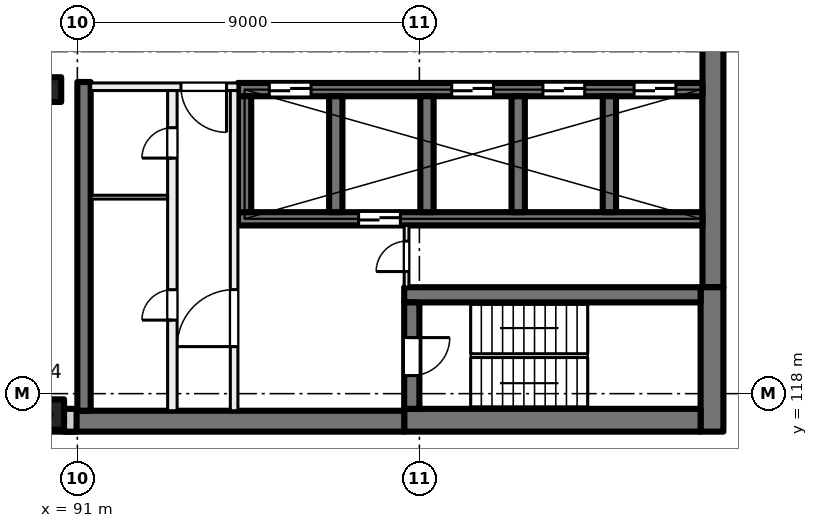
"""IFC4 building model, lengths in metres.
Left out: names, types, materials, properties, quantities, classifications, styles, units other than length and angle.
Written with IfcOpenShell. Run it as: python <this file> out.ifc"""

import sys

from ifc_helpers import new_model, si_unit, direction, frame, frame_2d, origin, origin_2d, place, context, subcontext, project, spatial, rectangle, extrude, element, fill, save


model = new_model("IFC4")
c1 = context("Model", 3, precision=1e-05, world=origin(), true_north=direction((0.0, 1.0)))
c2 = subcontext(c1, "Body", "Model", "MODEL_VIEW")
j1 = project(units=[si_unit("LENGTHUNIT", "METRE"), si_unit("PLANEANGLEUNIT", "RADIAN")], contexts=[c1])
p1 = place(None, origin())
s1 = spatial("IfcSite", under=j1, at=p1, CompositionType="ELEMENT")
p2 = place(p1, origin())
s2 = spatial("IfcBuilding", under=s1, at=p2, CompositionType="ELEMENT")
p3 = place(p2, frame((0.0, 0.0, 178.5)))
s3 = spatial("IfcBuildingStorey", under=s2, at=p3, CompositionType="ELEMENT", Elevation=178.5)
p4 = place(p3, frame((90.25, 126.0, 0.0), z_axis=(0.0, 0.0, 1.0), x_axis=(1.0, 0.0, 0.0)))
e1 = element("IfcColumn", 1, at=p4, inside=s3, PredefinedType="COLUMN", context=c2, shape_type="SweptSolid", body=[
    extrude(rectangle(XDim=0.65, YDim=0.65, at=origin_2d()), origin(), (0.0, 0.0, 1.0), 4.0),
])
p5 = place(p3, frame((90.25, 117.45, 0.0), z_axis=(0.0, 0.0, 1.0), x_axis=(1.0, 0.0, 0.0)))
e2 = element("IfcColumn", 2, at=p5, inside=s3, PredefinedType="COLUMN", context=c2, shape_type="SweptSolid", body=[
    extrude(rectangle(XDim=0.8, YDim=0.8, at=origin_2d()), origin(), (0.0, 0.0, 1.0), 4.0),
])
p6 = place(p3, frame((107.725, 135.2, 0.0), z_axis=(0.0, 0.0, 1.0), x_axis=(0.0, -1.0, 0.0)))
e3 = element("IfcWall", 3, at=p6, inside=s3, PredefinedType="SHEAR", context=c2, shape_type="SweptSolid", body=[
    extrude(rectangle(XDim=14.4, YDim=0.55, at=frame_2d((7.2, 0.0))), origin(), (0.0, 0.0, 1.0), 4.0),
])
p7 = place(p3, frame((107.7, 120.8, 0.0), z_axis=(0.0, 0.0, 1.0), x_axis=(0.0, -1.0, 0.0)))
e4 = element("IfcWall", 4, at=p7, inside=s3, PredefinedType="SHEAR", context=c2, shape_type="SweptSolid", body=[
    extrude(rectangle(XDim=3.8, YDim=0.6, at=frame_2d((1.9, 0.0))), origin(), (0.0, 0.0, 1.0), 4.0),
])
p8 = place(p3, frame((107.4, 117.3, 0.0), z_axis=(0.0, 0.0, 1.0), x_axis=(-1.0, 0.0, 0.0)))
e5 = element("IfcWall", 5, at=p8, inside=s3, PredefinedType="SHEAR", context=c2, shape_type="SweptSolid", body=[
    extrude(rectangle(XDim=7.8, YDim=0.6, at=frame_2d((3.9, 0.0))), origin(), (0.0, 0.0, 1.0), 4.0),
])
p9 = place(p3, frame((99.6, 117.275, 0.0), z_axis=(0.0, 0.0, 1.0), x_axis=(-1.0, 0.0, 0.0)))
e6 = element("IfcWall", 6, at=p9, inside=s3, PredefinedType="SHEAR", context=c2, shape_type="SweptSolid", body=[
    extrude(rectangle(XDim=8.95, YDim=0.55, at=frame_2d((4.475, 0.0))), origin(), (0.0, 0.0, 1.0), 4.0),
])
p10 = place(p3, frame((107.4, 120.6, 0.0), z_axis=(0.0, 0.0, 1.0), x_axis=(-1.0, 0.0, 0.0)))
e7 = element("IfcWall", 7, at=p10, inside=s3, PredefinedType="SHEAR", context=c2, shape_type="SweptSolid", body=[
    extrude(rectangle(XDim=7.8, YDim=0.4, at=frame_2d((3.9, 0.0))), origin(), (0.0, 0.0, 1.0), 4.0),
])
p11 = place(p3, frame((99.8, 120.4, 0.0), z_axis=(0.0, 0.0, 1.0), x_axis=(0.0, -1.0, 0.0)))
e8 = element("IfcWall", 8, at=p11, inside=s3, PredefinedType="SHEAR", context=c2, shape_type="SweptSolid", body=[
    extrude(rectangle(XDim=2.8, YDim=0.4, at=frame_2d((1.4, 0.0))), origin(), (0.0, 0.0, 1.0), 4.0),
])
p12 = place(p11, frame((0.925, 0.0, 0.0)))
e9 = element("IfcOpeningElement", 9, at=p12, cuts=e8, PredefinedType="OPENING", context=c2, shape_type="SweptSolid", body=[
    extrude(rectangle(XDim=1.0, YDim=2.1, at=frame_2d((0.5, 1.05))), frame((0.0, 0.21, 0.0), z_axis=(0.0, -1.0, 0.0), x_axis=(1.0, 0.0, 0.0)), (0.0, 0.0, 1.0), 0.42),
])
p13 = place(p3, frame((107.45, 126.0, 0.0), z_axis=(0.0, 0.0, 1.0), x_axis=(-1.0, 0.0, 0.0)))
e10 = element("IfcWall", 10, at=p13, inside=s3, PredefinedType="SHEAR", context=c2, shape_type="SweptSolid", body=[
    extrude(rectangle(XDim=12.225, YDim=0.35, at=frame_2d((6.112, 0.0))), origin(), (0.0, 0.0, 1.0), 4.0),
])
p14 = place(p13, frame((0.7, 0.0, 0.0)))
e11 = element("IfcOpeningElement", 11, at=p14, cuts=e10, PredefinedType="OPENING", context=c2, shape_type="SweptSolid", body=[
    extrude(rectangle(XDim=1.1, YDim=2.1, at=frame_2d((0.55, 1.05))), frame((0.0, 0.185, 0.0), z_axis=(0.0, -1.0, 0.0), x_axis=(1.0, 0.0, 0.0)), (0.0, 0.0, 1.0), 0.37),
])
p15 = place(p13, frame((3.1, 0.0, 0.0)))
e12 = element("IfcOpeningElement", 12, at=p15, cuts=e10, PredefinedType="OPENING", context=c2, shape_type="SweptSolid", body=[
    extrude(rectangle(XDim=1.1, YDim=2.1, at=frame_2d((0.55, 1.05))), frame((0.0, 0.185, 0.0), z_axis=(0.0, -1.0, 0.0), x_axis=(1.0, 0.0, 0.0)), (0.0, 0.0, 1.0), 0.37),
])
p16 = place(p13, frame((5.5, 0.0, 0.0)))
e13 = element("IfcOpeningElement", 13, at=p16, cuts=e10, PredefinedType="OPENING", context=c2, shape_type="SweptSolid", body=[
    extrude(rectangle(XDim=1.1, YDim=2.1, at=frame_2d((0.55, 1.05))), frame((0.0, 0.185, 0.0), z_axis=(0.0, -1.0, 0.0), x_axis=(1.0, 0.0, 0.0)), (0.0, 0.0, 1.0), 0.37),
])
p17 = place(p13, frame((10.3, 0.0, 0.0)))
e14 = element("IfcOpeningElement", 14, at=p17, cuts=e10, PredefinedType="OPENING", context=c2, shape_type="SweptSolid", body=[
    extrude(rectangle(XDim=1.1, YDim=2.1, at=frame_2d((0.55, 1.05))), frame((0.0, 0.185, 0.0), z_axis=(0.0, -1.0, 0.0), x_axis=(1.0, 0.0, 0.0)), (0.0, 0.0, 1.0), 0.37),
])
p18 = place(p3, frame((107.45, 122.6, 0.0), z_axis=(0.0, 0.0, 1.0), x_axis=(-1.0, 0.0, 0.0)))
e15 = element("IfcWall", 15, at=p18, inside=s3, PredefinedType="SHEAR", context=c2, shape_type="SweptSolid", body=[
    extrude(rectangle(XDim=12.225, YDim=0.35, at=frame_2d((6.112, 0.0))), origin(), (0.0, 0.0, 1.0), 4.0),
])
p19 = place(p18, frame((7.95, 0.0, 0.0)))
e16 = element("IfcOpeningElement", 16, at=p19, cuts=e15, PredefinedType="OPENING", context=c2, shape_type="SweptSolid", body=[
    extrude(rectangle(XDim=1.1, YDim=2.1, at=frame_2d((0.55, 1.05))), frame((0.0, 0.185, 0.0), z_axis=(0.0, -1.0, 0.0), x_axis=(1.0, 0.0, 0.0)), (0.0, 0.0, 1.0), 0.37),
])
for number, where, z_axis, x_axis in (
    (17, (105.0, 125.825, 0.0), (0.0, 0.0, 1.0), (0.0, -1.0, 0.0)),
    (18, (102.6, 125.825, 0.0), (0.0, 0.0, 1.0), (0.0, -1.0, 0.0)),
    (19, (100.2, 125.825, 0.0), (0.0, 0.0, 1.0), (0.0, -1.0, 0.0)),
    (20, (97.8, 125.825, 0.0), (0.0, 0.0, 1.0), (0.0, -1.0, 0.0)),
    (21, (95.4, 125.825, 0.0), (0.0, 0.0, 1.0), (0.0, -1.0, 0.0)),
):
    element("IfcWall", number, at=place(p3, frame(where, z_axis=z_axis, x_axis=x_axis)), inside=s3, PredefinedType="SHEAR", context=c2, shape_type="SweptSolid", body=[
        extrude(rectangle(XDim=3.05, YDim=0.35, at=frame_2d((1.525, 0.0))), origin(), (0.0, 0.0, 1.0), 4.0),
    ])
p20 = place(p3, frame((91.175, 126.2, 0.0), z_axis=(0.0, 0.0, 1.0), x_axis=(0.0, -1.0, 0.0)))
e22 = element("IfcWall", 22, at=p20, inside=s3, PredefinedType="SHEAR", context=c2, shape_type="SweptSolid", body=[
    extrude(rectangle(XDim=8.65, YDim=0.35, at=frame_2d((4.325, 0.0))), origin(), (0.0, 0.0, 1.0), 4.0),
])
p21 = place(p3, frame((90.98, 117.3, 0.0), z_axis=(0.0, 0.0, 1.0), x_axis=(-1.0, 0.0, 0.0)))
e23 = element("IfcWall", 23, at=p21, inside=s3, PredefinedType="SOLIDWALL", context=c2, shape_type="SweptSolid", body=[
    extrude(rectangle(XDim=33.745, YDim=0.6, at=frame_2d((16.873, 0.0))), origin(), (0.0, 0.0, 1.0), 3.625),
])
p22 = place(p21, frame((1.48, 0.0, 0.9)))
e24 = element("IfcOpeningElement", 24, at=p22, cuts=e23, PredefinedType="OPENING", context=c2, shape_type="SweptSolid", body=[
    extrude(rectangle(XDim=3.0, YDim=2.4, at=frame_2d((1.5, 1.2))), frame((0.0, 0.31, 0.0), z_axis=(0.0, -1.0, 0.0), x_axis=(1.0, 0.0, 0.0)), (0.0, 0.0, 1.0), 0.62),
])
p23 = place(p21, frame((5.98, 0.0, 0.9)))
e25 = element("IfcOpeningElement", 25, at=p23, cuts=e23, PredefinedType="OPENING", context=c2, shape_type="SweptSolid", body=[
    extrude(rectangle(XDim=3.0, YDim=2.4, at=frame_2d((1.5, 1.2))), frame((0.0, 0.31, 0.0), z_axis=(0.0, -1.0, 0.0), x_axis=(1.0, 0.0, 0.0)), (0.0, 0.0, 1.0), 0.62),
])
p24 = place(p21, frame((10.48, 0.0, 0.9)))
e26 = element("IfcOpeningElement", 26, at=p24, cuts=e23, PredefinedType="OPENING", context=c2, shape_type="SweptSolid", body=[
    extrude(rectangle(XDim=3.0, YDim=2.4, at=frame_2d((1.5, 1.2))), frame((0.0, 0.31, 0.0), z_axis=(0.0, -1.0, 0.0), x_axis=(1.0, 0.0, 0.0)), (0.0, 0.0, 1.0), 0.62),
])
p25 = place(p21, frame((14.98, 0.0, 0.9)))
e27 = element("IfcOpeningElement", 27, at=p25, cuts=e23, PredefinedType="OPENING", context=c2, shape_type="SweptSolid", body=[
    extrude(rectangle(XDim=3.0, YDim=2.4, at=frame_2d((1.5, 1.2))), frame((0.0, 0.31, 0.0), z_axis=(0.0, -1.0, 0.0), x_axis=(1.0, 0.0, 0.0)), (0.0, 0.0, 1.0), 0.62),
])
p26 = place(p21, frame((19.48, 0.0, 0.9)))
e28 = element("IfcOpeningElement", 28, at=p26, cuts=e23, PredefinedType="OPENING", context=c2, shape_type="SweptSolid", body=[
    extrude(rectangle(XDim=3.0, YDim=2.4, at=frame_2d((1.5, 1.2))), frame((0.0, 0.31, 0.0), z_axis=(0.0, -1.0, 0.0), x_axis=(1.0, 0.0, 0.0)), (0.0, 0.0, 1.0), 0.62),
])
p27 = place(p21, frame((23.98, 0.0, 0.9)))
e29 = element("IfcOpeningElement", 29, at=p27, cuts=e23, PredefinedType="OPENING", context=c2, shape_type="SweptSolid", body=[
    extrude(rectangle(XDim=3.0, YDim=2.4, at=frame_2d((1.5, 1.2))), frame((0.0, 0.31, 0.0), z_axis=(0.0, -1.0, 0.0), x_axis=(1.0, 0.0, 0.0)), (0.0, 0.0, 1.0), 0.62),
])
p28 = place(p21, frame((29.08, 0.0, 0.0)))
e30 = element("IfcOpeningElement", 30, at=p28, cuts=e23, PredefinedType="OPENING", context=c2, shape_type="SweptSolid", body=[
    extrude(rectangle(XDim=1.8, YDim=2.4, at=frame_2d((0.9, 1.2))), frame((0.0, 0.31, 0.0), z_axis=(0.0, -1.0, 0.0), x_axis=(1.0, 0.0, 0.0)), (0.0, 0.0, 1.0), 0.62),
])
p29 = place(p3, frame((95.225, 126.075, 0.0), z_axis=(0.0, 0.0, 1.0), x_axis=(-1.0, 0.0, 0.0)))
e31 = element("IfcWall", 31, at=p29, inside=s3, PredefinedType="PARTITIONING", context=c2, shape_type="SweptSolid", body=[
    extrude(rectangle(XDim=3.875, YDim=0.2, at=frame_2d((1.938, 0.0))), origin(), (0.0, 0.0, 1.0), 3.625),
])
p30 = place(p29, frame((0.3, 0.0, 0.0)))
e32 = element("IfcOpeningElement", 32, at=p30, cuts=e31, PredefinedType="OPENING", context=c2, shape_type="SweptSolid", body=[
    extrude(rectangle(XDim=1.2, YDim=2.1, at=frame_2d((0.6, 1.05))), frame((0.0, 0.11, 0.0), z_axis=(0.0, -1.0, 0.0), x_axis=(1.0, 0.0, 0.0)), (0.0, 0.0, 1.0), 0.22),
])
p31 = place(p3, frame((95.125, 117.55, 0.0), z_axis=(0.0, 0.0, 1.0), x_axis=(0.0, 1.0, 0.0)))
e33 = element("IfcWall", 33, at=p31, inside=s3, PredefinedType="PARTITIONING", context=c2, shape_type="SweptSolid", body=[
    extrude(rectangle(XDim=8.425, YDim=0.2, at=frame_2d((4.212, 0.0))), origin(), (0.0, 0.0, 1.0), 3.625),
])
p32 = place(p31, frame((1.688, 0.0, 0.0)))
e34 = element("IfcOpeningElement", 34, at=p32, cuts=e33, PredefinedType="OPENING", context=c2, shape_type="SweptSolid", body=[
    extrude(rectangle(XDim=1.5, YDim=2.1, at=frame_2d((0.75, 1.05))), frame((0.0, 0.11, 0.0), z_axis=(0.0, -1.0, 0.0), x_axis=(1.0, 0.0, 0.0)), (0.0, 0.0, 1.0), 0.22),
])
p33 = place(p3, frame((93.5, 117.55, 0.0), z_axis=(0.0, 0.0, 1.0), x_axis=(0.0, 1.0, 0.0)))
e35 = element("IfcWall", 35, at=p33, inside=s3, PredefinedType="PARTITIONING", context=c2, shape_type="SweptSolid", body=[
    extrude(rectangle(XDim=8.425, YDim=0.25, at=frame_2d((4.212, 0.0))), origin(), (0.0, 0.0, 1.0), 3.625),
])
p34 = place(p33, frame((6.647, 0.0, 0.0)))
e36 = element("IfcOpeningElement", 36, at=p34, cuts=e35, PredefinedType="OPENING", context=c2, shape_type="SweptSolid", body=[
    extrude(rectangle(XDim=0.8, YDim=2.1, at=frame_2d((0.4, 1.05))), frame((0.0, 0.135, 0.0), z_axis=(0.0, -1.0, 0.0), x_axis=(1.0, 0.0, 0.0)), (0.0, 0.0, 1.0), 0.27),
])
p35 = place(p33, frame((2.385, 0.0, 0.0)))
e37 = element("IfcOpeningElement", 37, at=p35, cuts=e35, PredefinedType="OPENING", context=c2, shape_type="SweptSolid", body=[
    extrude(rectangle(XDim=0.8, YDim=2.1, at=frame_2d((0.4, 1.05))), frame((0.0, 0.135, 0.0), z_axis=(0.0, -1.0, 0.0), x_axis=(1.0, 0.0, 0.0)), (0.0, 0.0, 1.0), 0.27),
])
p36 = place(p3, frame((99.663, 120.8, 0.0), z_axis=(0.0, 0.0, 1.0), x_axis=(0.0, 1.0, 0.0)))
e38 = element("IfcWall", 38, at=p36, inside=s3, PredefinedType="PARTITIONING", context=c2, shape_type="SweptSolid", body=[
    extrude(rectangle(XDim=1.625, YDim=0.125, at=frame_2d((0.812, 0.0))), origin(), (0.0, 0.0, 1.0), 3.625),
])
p37 = place(p36, frame((0.413, 0.0, 0.0)))
e39 = element("IfcOpeningElement", 39, at=p37, cuts=e38, PredefinedType="OPENING", context=c2, shape_type="SweptSolid", body=[
    extrude(rectangle(XDim=0.8, YDim=2.1, at=frame_2d((0.4, 1.05))), frame((0.0, 0.073, 0.0), z_axis=(0.0, -1.0, 0.0), x_axis=(1.0, 0.0, 0.0)), (0.0, 0.0, 1.0), 0.145),
])
p38 = place(p3, frame((93.375, 123.17, 0.0), z_axis=(0.0, 0.0, 1.0), x_axis=(-1.0, 0.0, 0.0)))
e40 = element("IfcWall", 40, at=p38, inside=s3, PredefinedType="PARTITIONING", context=c2, shape_type="SweptSolid", body=[
    extrude(rectangle(XDim=2.025, YDim=0.1, at=frame_2d((1.012, 0.0))), origin(), (0.0, 0.0, 1.0), 3.625),
])
p39 = place(p14, origin())
e41 = element("IfcDoor", 41, at=p39, inside=s3, OperationType="DOUBLE_DOOR_SLIDING", PredefinedType="DOOR", context=c2, shape_type="SweptSolid", body=[
    extrude(rectangle(XDim=1.1, YDim=2.1, at=frame_2d((0.55, 1.05))), frame((0.0, 0.025, 0.0), z_axis=(0.0, -1.0, 0.0), x_axis=(1.0, 0.0, 0.0)), (0.0, 0.0, 1.0), 0.05),
])
fill(e11, e41)
p40 = place(p15, origin())
e42 = element("IfcDoor", 42, at=p40, inside=s3, OperationType="DOUBLE_DOOR_SLIDING", PredefinedType="DOOR", context=c2, shape_type="SweptSolid", body=[
    extrude(rectangle(XDim=1.1, YDim=2.1, at=frame_2d((0.55, 1.05))), frame((0.0, 0.025, 0.0), z_axis=(0.0, -1.0, 0.0), x_axis=(1.0, 0.0, 0.0)), (0.0, 0.0, 1.0), 0.05),
])
fill(e12, e42)
p41 = place(p16, origin())
e43 = element("IfcDoor", 43, at=p41, inside=s3, OperationType="DOUBLE_DOOR_SLIDING", PredefinedType="DOOR", context=c2, shape_type="SweptSolid", body=[
    extrude(rectangle(XDim=1.1, YDim=2.1, at=frame_2d((0.55, 1.05))), frame((0.0, 0.025, 0.0), z_axis=(0.0, -1.0, 0.0), x_axis=(1.0, 0.0, 0.0)), (0.0, 0.0, 1.0), 0.05),
])
fill(e13, e43)
p42 = place(p17, origin())
e44 = element("IfcDoor", 44, at=p42, inside=s3, OperationType="DOUBLE_DOOR_SLIDING", PredefinedType="DOOR", context=c2, shape_type="SweptSolid", body=[
    extrude(rectangle(XDim=1.1, YDim=2.1, at=frame_2d((0.55, 1.05))), frame((0.0, 0.025, 0.0), z_axis=(0.0, -1.0, 0.0), x_axis=(1.0, 0.0, 0.0)), (0.0, 0.0, 1.0), 0.05),
])
fill(e14, e44)
p43 = place(p30, origin())
e45 = element("IfcDoor", 45, at=p43, inside=s3, OperationType="DOUBLE_DOOR_SINGLE_SWING", PredefinedType="DOOR", context=c2, shape_type="SweptSolid", body=[
    extrude(rectangle(XDim=1.2, YDim=2.1, at=frame_2d((0.6, 1.05))), frame((0.0, 0.025, 0.0), z_axis=(0.0, -1.0, 0.0), x_axis=(1.0, 0.0, 0.0)), (0.0, 0.0, 1.0), 0.05),
])
fill(e32, e45)
p44 = place(p32, origin())
e46 = element("IfcDoor", 46, at=p44, inside=s3, OperationType="DOUBLE_DOOR_SINGLE_SWING", PredefinedType="DOOR", context=c2, shape_type="SweptSolid", body=[
    extrude(rectangle(XDim=1.5, YDim=2.1, at=frame_2d((0.75, 1.05))), frame((0.0, 0.025, 0.0), z_axis=(0.0, -1.0, 0.0), x_axis=(1.0, 0.0, 0.0)), (0.0, 0.0, 1.0), 0.05),
])
fill(e34, e46)
p45 = place(p12, origin())
e47 = element("IfcDoor", 47, at=p45, inside=s3, OperationType="SINGLE_SWING_LEFT", PredefinedType="DOOR", context=c2, shape_type="SweptSolid", body=[
    extrude(rectangle(XDim=1.0, YDim=2.1, at=frame_2d((0.5, 1.05))), frame((0.0, 0.025, 0.0), z_axis=(0.0, -1.0, 0.0), x_axis=(1.0, 0.0, 0.0)), (0.0, 0.0, 1.0), 0.05),
])
fill(e9, e47)
p46 = place(p37, origin())
e48 = element("IfcDoor", 48, at=p46, inside=s3, OperationType="SINGLE_SWING_RIGHT", PredefinedType="DOOR", context=c2, shape_type="SweptSolid", body=[
    extrude(rectangle(XDim=0.8, YDim=2.1, at=frame_2d((0.4, 1.05))), frame((0.0, 0.025, 0.0), z_axis=(0.0, -1.0, 0.0), x_axis=(1.0, 0.0, 0.0)), (0.0, 0.0, 1.0), 0.05),
])
fill(e39, e48)
p47 = place(p34, origin())
e49 = element("IfcDoor", 49, at=p47, inside=s3, OperationType="SINGLE_SWING_LEFT", PredefinedType="DOOR", context=c2, shape_type="SweptSolid", body=[
    extrude(rectangle(XDim=0.8, YDim=2.1, at=frame_2d((0.4, 1.05))), frame((0.0, 0.025, 0.0), z_axis=(0.0, -1.0, 0.0), x_axis=(1.0, 0.0, 0.0)), (0.0, 0.0, 1.0), 0.05),
])
fill(e36, e49)
p48 = place(p35, origin())
e50 = element("IfcDoor", 50, at=p48, inside=s3, OperationType="SINGLE_SWING_RIGHT", PredefinedType="DOOR", context=c2, shape_type="SweptSolid", body=[
    extrude(rectangle(XDim=0.8, YDim=2.1, at=frame_2d((0.4, 1.05))), frame((0.0, 0.025, 0.0), z_axis=(0.0, -1.0, 0.0), x_axis=(1.0, 0.0, 0.0)), (0.0, 0.0, 1.0), 0.05),
])
fill(e37, e50)
p49 = place(p19, origin())
e51 = element("IfcDoor", 51, at=p49, inside=s3, OperationType="DOUBLE_DOOR_SLIDING", PredefinedType="DOOR", context=c2, shape_type="SweptSolid", body=[
    extrude(rectangle(XDim=1.1, YDim=2.1, at=frame_2d((0.55, 1.05))), frame((0.0, 0.025, 0.0), z_axis=(0.0, -1.0, 0.0), x_axis=(1.0, 0.0, 0.0)), (0.0, 0.0, 1.0), 0.05),
])
fill(e16, e51)
save(model, sys.argv[1])
